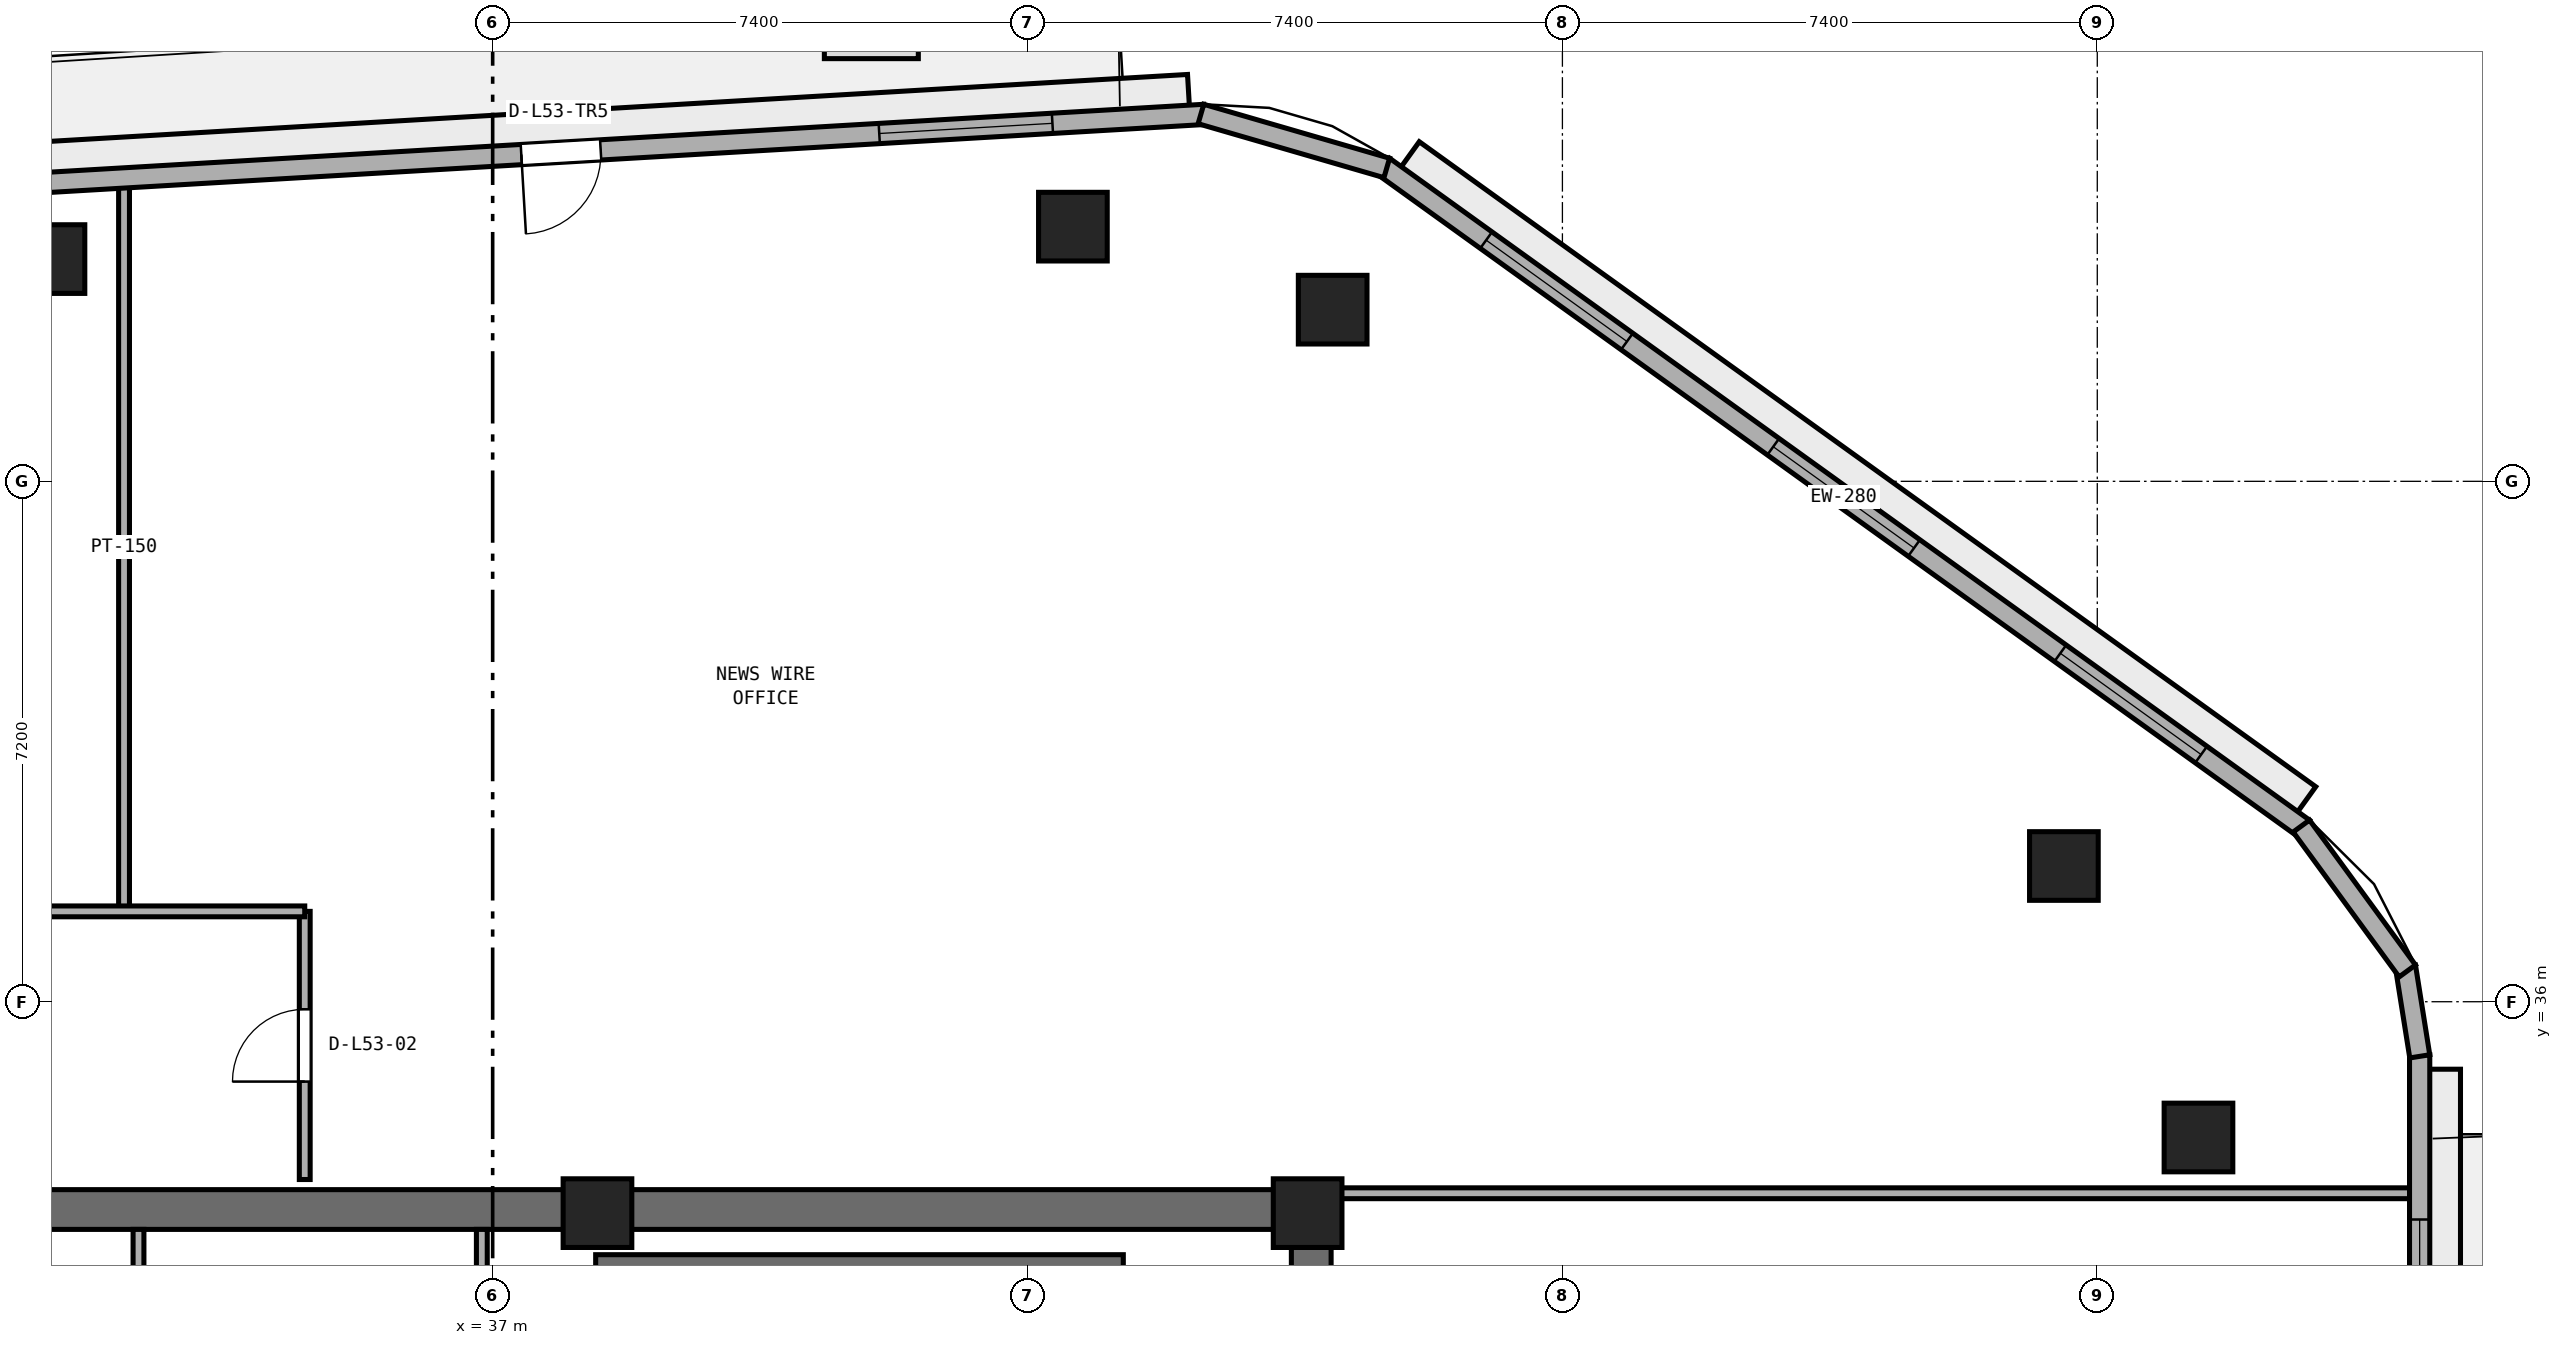
"""IFC4 building model, lengths in metres.
Left out: names, types, materials, properties, quantities, classifications, styles, units other than length and angle.
Written with IfcOpenShell. Run it as: python <this file> out.ifc"""

import sys

from ifc_helpers import new_model, si_unit, direction, frame, frame_2d, origin, origin_2d, place, context, subcontext, project, spatial, rectangle, extrude, element, fill, save


model = new_model("IFC4")
c1 = context("Model", 3, precision=1e-05, world=origin(), true_north=direction((0.0, 1.0)))
c2 = subcontext(c1, "Body", "Model", "MODEL_VIEW")
j1 = project(units=[si_unit("LENGTHUNIT", "METRE"), si_unit("PLANEANGLEUNIT", "RADIAN")], contexts=[c1])
p1 = place(None, origin())
s1 = spatial("IfcSite", under=j1, at=p1, CompositionType="ELEMENT")
p2 = place(p1, origin())
s2 = spatial("IfcBuilding", under=s1, at=p2, CompositionType="ELEMENT")
p3 = place(p2, frame((0.0, 0.0, 208.6)))
s3 = spatial("IfcBuildingStorey", under=s2, at=p3, CompositionType="ELEMENT", Elevation=208.6)
p4 = place(p3, frame((25.4, 33.125, 0.0), z_axis=(0.0, 0.0, 1.0), x_axis=(1.0, 0.0, 0.0)))
e1 = element("IfcWall", 1, at=p4, inside=s3, PredefinedType="SHEAR", context=c2, shape_type="SweptSolid", body=[
    extrude(rectangle(XDim=23.2, YDim=0.55, at=frame_2d((11.6, 0.0))), origin(), (0.0, 0.0, 1.0), 3.54),
])
p5 = place(p3, frame((48.325, 17.55, 0.0), z_axis=(0.0, 0.0, 1.0), x_axis=(0.0, 1.0, 0.0)))
e2 = element("IfcWall", 2, at=p5, inside=s3, PredefinedType="SHEAR", context=c2, shape_type="SweptSolid", body=[
    extrude(rectangle(XDim=15.3, YDim=0.55, at=frame_2d((7.65, 0.0))), origin(), (0.0, 0.0, 1.0), 3.54),
])
p6 = place(p5, frame((5.75, 0.0, 0.0)))
e3 = element("IfcOpeningElement", 3, at=p6, cuts=e2, PredefinedType="OPENING", context=c2, shape_type="SweptSolid", body=[
    extrude(rectangle(XDim=1.5, YDim=2.15, at=frame_2d((0.75, 1.075))), frame((0.0, 0.285, 0.0), z_axis=(0.0, -1.0, 0.0), x_axis=(1.0, 0.0, 0.0)), (0.0, 0.0, 1.0), 0.57),
])
for number, where, z_axis, x_axis in (
    (4, (48.275, 33.075, 0.0), (0.0, 0.0, 1.0), (1.0, 0.0, 0.0)),
    (5, (38.45, 33.075, 0.0), (0.0, 0.0, 1.0), (1.0, 0.0, 0.0)),
):
    element("IfcColumn", number, at=place(p3, frame(where, z_axis=z_axis, x_axis=x_axis)), inside=s3, PredefinedType="PILASTER", context=c2, shape_type="SweptSolid", body=[
        extrude(rectangle(XDim=0.95, YDim=0.95, at=origin_2d()), origin(), (0.0, 0.0, 1.0), 3.8),
    ])
for number, where, z_axis, x_axis in (
    (6, (60.6, 34.122, 0.0), (0.0, 0.0, 1.0), (1.0, 0.0, 0.0)),
    (7, (58.738, 37.878, 0.0), (0.0, 0.0, 1.0), (1.0, 0.0, 0.0)),
    (8, (48.622, 45.575, 0.0), (0.0, 0.0, 1.0), (1.0, 0.0, 0.0)),
    (9, (45.028, 46.724, 0.0), (0.0, 0.0, 1.0), (1.0, 0.0, 0.0)),
    (10, (30.882, 46.275, 0.0), (0.0, 0.0, 1.0), (1.0, 0.0, 0.0)),
):
    element("IfcColumn", number, at=place(p3, frame(where, z_axis=z_axis, x_axis=x_axis)), inside=s3, PredefinedType="COLUMN", context=c2, shape_type="SweptSolid", body=[
        extrude(rectangle(XDim=0.95, YDim=0.95, at=origin_2d()), origin(), (0.0, 0.0, 1.0), 3.8),
    ])
p7 = place(p3, frame((38.425, 32.375, 0.0), z_axis=(0.0, 0.0, 1.0), x_axis=(1.0, 0.0, 0.0)))
e11 = element("IfcWall", 11, at=p7, inside=s3, PredefinedType="SHEAR", context=c2, shape_type="SweptSolid", body=[
    extrude(rectangle(XDim=7.3, YDim=0.25, at=frame_2d((3.65, 0.0))), origin(), (0.0, 0.0, 1.0), 3.54),
])
for number, where, z_axis, x_axis in (
    (12, (32.1, 30.65, 0.0), (0.0, 0.0, 1.0), (0.0, 1.0, 0.0)),
    (13, (36.85, 30.65, 0.0), (0.0, 0.0, 1.0), (0.0, 1.0, 0.0)),
):
    element("IfcWall", number, at=place(p3, frame(where, z_axis=z_axis, x_axis=x_axis)), inside=s3, PredefinedType="PARTITIONING", context=c2, shape_type="SweptSolid", body=[
        extrude(rectangle(XDim=2.2, YDim=0.15, at=frame_2d((1.1, 0.0))), origin(), (0.0, 0.0, 1.0), 3.54),
    ])
p8 = place(p3, frame((34.4, 33.54, 0.0), z_axis=(0.0, 0.0, 1.0), x_axis=(0.0, 1.0, 0.0)))
e14 = element("IfcWall", 14, at=p8, inside=s3, PredefinedType="PARTITIONING", context=c2, shape_type="SweptSolid", body=[
    extrude(rectangle(XDim=3.71, YDim=0.15, at=frame_2d((1.855, 0.0))), origin(), (0.0, 0.0, 1.0), 3.54),
])
p9 = place(p8, frame((1.355, 0.0, 0.0)))
e15 = element("IfcOpeningElement", 15, at=p9, cuts=e14, PredefinedType="OPENING", context=c2, shape_type="SweptSolid", body=[
    extrude(rectangle(XDim=1.0, YDim=2.12, at=frame_2d((0.5, 1.06))), frame((0.0, 0.085, 0.0), z_axis=(0.0, -1.0, 0.0), x_axis=(1.0, 0.0, 0.0)), (0.0, 0.0, 1.0), 0.17),
])
p10 = place(p3, frame((31.9, 37.25, 0.0), z_axis=(0.0, 0.0, 1.0), x_axis=(0.0, 1.0, 0.0)))
e16 = element("IfcWall", 16, at=p10, inside=s3, PredefinedType="PARTITIONING", context=c2, shape_type="SweptSolid", body=[
    extrude(rectangle(XDim=10.083, YDim=0.15, at=frame_2d((5.042, 0.0))), origin(), (0.0, 0.0, 1.0), 3.54),
])
p11 = place(p3, frame((48.74, 33.35, 0.0), z_axis=(0.0, 0.0, 1.0), x_axis=(1.0, 0.0, 0.0)))
e17 = element("IfcWall", 17, at=p11, inside=s3, PredefinedType="PARTITIONING", context=c2, shape_type="SweptSolid", body=[
    extrude(rectangle(XDim=14.855, YDim=0.15, at=frame_2d((7.427, 0.0))), origin(), (0.0, 0.0, 1.0), 2.923),
])
p12 = place(p3, frame((21.55, 37.25, 0.0), z_axis=(0.0, 0.0, 1.0), x_axis=(1.0, 0.0, 0.0)))
e18 = element("IfcWall", 18, at=p12, inside=s3, PredefinedType="PARTITIONING", context=c2, shape_type="SweptSolid", body=[
    extrude(rectangle(XDim=12.85, YDim=0.15, at=frame_2d((6.425, 0.0))), origin(), (0.0, 0.0, 1.0), 3.54),
])
p13 = place(p12, frame((4.795, 0.0, 0.0)))
e19 = element("IfcOpeningElement", 19, at=p13, cuts=e18, PredefinedType="OPENING", context=c2, shape_type="SweptSolid", body=[
    extrude(rectangle(XDim=1.0, YDim=2.12, at=frame_2d((0.5, 1.06))), frame((0.0, 0.085, 0.0), z_axis=(0.0, -1.0, 0.0), x_axis=(1.0, 0.0, 0.0)), (0.0, 0.0, 1.0), 0.17),
])
p14 = place(p3, frame((63.66, 16.39, 0.0), z_axis=(0.0, 0.0, 1.0), x_axis=(0.0, 1.0, 0.0)))
e20 = element("IfcWall", 20, at=p14, inside=s3, PredefinedType="STANDARD", context=c2, shape_type="SweptSolid", body=[
    extrude(rectangle(XDim=18.876, YDim=0.28, at=frame_2d((9.438, 0.0))), origin(), (0.0, 0.0, 1.0), 3.54),
])
p15 = place(p14, frame((8.588, 0.0, 0.0)))
e21 = element("IfcOpeningElement", 21, at=p15, cuts=e20, PredefinedType="OPENING", context=c2, shape_type="SweptSolid", body=[
    extrude(rectangle(XDim=1.1, YDim=2.2, at=frame_2d((0.55, 1.1))), frame((0.0, 0.15, 0.0), z_axis=(0.0, -1.0, 0.0), x_axis=(1.0, 0.0, 0.0)), (0.0, 0.0, 1.0), 0.3),
])
p16 = place(p14, frame((2.029, 0.0, 0.9)))
e22 = element("IfcOpeningElement", 22, at=p16, cuts=e20, PredefinedType="OPENING", context=c2, shape_type="SweptSolid", body=[
    extrude(rectangle(XDim=2.4, YDim=1.75, at=frame_2d((1.2, 0.875))), frame((0.0, 0.15, 0.0), z_axis=(0.0, -1.0, 0.0), x_axis=(1.0, 0.0, 0.0)), (0.0, 0.0, 1.0), 0.3),
])
p17 = place(p14, frame((14.197, 0.0, 0.9)))
e23 = element("IfcOpeningElement", 23, at=p17, cuts=e20, PredefinedType="OPENING", context=c2, shape_type="SweptSolid", body=[
    extrude(rectangle(XDim=2.4, YDim=1.75, at=frame_2d((1.2, 0.875))), frame((0.0, 0.15, 0.0), z_axis=(0.0, -1.0, 0.0), x_axis=(1.0, 0.0, 0.0)), (0.0, 0.0, 1.0), 0.3),
])
p18 = place(p3, frame((62.054, 38.399, 0.0), z_axis=(0.0, 0.0, 1.0), x_axis=(-0.81172124793, 0.584045045915, 0.0)))
e24 = element("IfcWall", 24, at=p18, inside=s3, PredefinedType="STANDARD", context=c2, shape_type="SweptSolid", body=[
    extrude(rectangle(XDim=15.679, YDim=0.28, at=frame_2d((7.84, 0.0))), origin(), (0.0, 0.0, 1.0), 3.54),
])
p19 = place(p18, frame((1.747, 0.0, 0.9)))
e25 = element("IfcOpeningElement", 25, at=p19, cuts=e24, PredefinedType="OPENING", context=c2, shape_type="SweptSolid", body=[
    extrude(rectangle(XDim=2.4, YDim=1.75, at=frame_2d((1.2, 0.875))), frame((0.0, 0.15, 0.0), z_axis=(0.0, -1.0, 0.0), x_axis=(1.0, 0.0, 0.0)), (0.0, 0.0, 1.0), 0.3),
])
p20 = place(p18, frame((6.64, 0.0, 0.9)))
e26 = element("IfcOpeningElement", 26, at=p20, cuts=e24, PredefinedType="OPENING", context=c2, shape_type="SweptSolid", body=[
    extrude(rectangle(XDim=2.4, YDim=1.75, at=frame_2d((1.2, 0.875))), frame((0.0, 0.15, 0.0), z_axis=(0.0, -1.0, 0.0), x_axis=(1.0, 0.0, 0.0)), (0.0, 0.0, 1.0), 0.3),
])
p21 = place(p18, frame((11.533, 0.0, 0.9)))
e27 = element("IfcOpeningElement", 27, at=p21, cuts=e24, PredefinedType="OPENING", context=c2, shape_type="SweptSolid", body=[
    extrude(rectangle(XDim=2.4, YDim=1.75, at=frame_2d((1.2, 0.875))), frame((0.0, 0.15, 0.0), z_axis=(0.0, -1.0, 0.0), x_axis=(1.0, 0.0, 0.0)), (0.0, 0.0, 1.0), 0.3),
])
p22 = place(p3, frame((46.846, 48.277, 0.0), z_axis=(0.0, 0.0, 1.0), x_axis=(-0.998273806631, -0.05873165241, 0.0)))
e28 = element("IfcWall", 28, at=p22, inside=s3, PredefinedType="STANDARD", context=c2, shape_type="SweptSolid", body=[
    extrude(rectangle(XDim=17.833, YDim=0.28, at=frame_2d((8.917, 0.0))), origin(), (0.0, 0.0, 1.0), 3.54),
])
p23 = place(p22, frame((8.366, 0.0, 0.0)))
e29 = element("IfcOpeningElement", 29, at=p23, cuts=e28, PredefinedType="OPENING", context=c2, shape_type="SweptSolid", body=[
    extrude(rectangle(XDim=1.1, YDim=2.2, at=frame_2d((0.55, 1.1))), frame((0.0, 0.15, 0.0), z_axis=(0.0, -1.0, 0.0), x_axis=(1.0, 0.0, 0.0)), (0.0, 0.0, 1.0), 0.3),
])
p24 = place(p22, frame((2.105, 0.0, 0.9)))
e30 = element("IfcOpeningElement", 30, at=p24, cuts=e28, PredefinedType="OPENING", context=c2, shape_type="SweptSolid", body=[
    extrude(rectangle(XDim=2.4, YDim=1.75, at=frame_2d((1.2, 0.875))), frame((0.0, 0.15, 0.0), z_axis=(0.0, -1.0, 0.0), x_axis=(1.0, 0.0, 0.0)), (0.0, 0.0, 1.0), 0.3),
])
p25 = place(p3, frame((63.662, 35.244, 0.0), z_axis=(0.0, 0.0, 1.0), x_axis=(-0.157059104921, 0.987589204863, 0.0)))
e31 = element("IfcWall", 31, at=p25, inside=s3, PredefinedType="STANDARD", context=c2, shape_type="SweptSolid", body=[
    extrude(rectangle(XDim=1.258, YDim=0.28, at=frame_2d((0.629, 0.0))), origin(), (0.0, 0.0, 1.0), 3.54),
])
p26 = place(p3, frame((63.489, 36.426, 0.0), z_axis=(0.0, 0.0, 1.0), x_axis=(-0.590267940876, 0.80720738226, 0.0)))
e32 = element("IfcWall", 32, at=p26, inside=s3, PredefinedType="STANDARD", context=c2, shape_type="SweptSolid", body=[
    extrude(rectangle(XDim=2.484, YDim=0.28, at=frame_2d((1.242, 0.0))), origin(), (0.0, 0.0, 1.0), 3.54),
])
p27 = place(p3, frame((49.37, 47.536, 0.0), z_axis=(0.0, 0.0, 1.0), x_axis=(-0.960380089791, 0.278693529048, 0.0)))
e33 = element("IfcWall", 33, at=p27, inside=s3, PredefinedType="STANDARD", context=c2, shape_type="SweptSolid", body=[
    extrude(rectangle(XDim=2.677, YDim=0.28, at=frame_2d((1.338, 0.0))), origin(), (0.0, 0.0, 1.0), 3.54),
])
p28 = place(p9, origin())
e34 = element("IfcDoor", 34, at=p28, inside=s3, OperationType="SINGLE_SWING_LEFT", PredefinedType="DOOR", context=c2, shape_type="SweptSolid", body=[
    extrude(rectangle(XDim=1.0, YDim=2.12, at=frame_2d((0.5, 1.06))), frame((0.0, 0.025, 0.0), z_axis=(0.0, -1.0, 0.0), x_axis=(1.0, 0.0, 0.0)), (0.0, 0.0, 1.0), 0.05),
])
fill(e15, e34)
p29 = place(p17, origin())
e35 = element("IfcWindow", 35, at=p29, inside=s3, PartitioningType="SINGLE_PANEL", PredefinedType="WINDOW", context=c2, shape_type="SweptSolid", body=[
    extrude(rectangle(XDim=2.4, YDim=1.75, at=frame_2d((1.2, 0.875))), frame((0.0, 0.03, 0.0), z_axis=(0.0, -1.0, 0.0), x_axis=(1.0, 0.0, 0.0)), (0.0, 0.0, 1.0), 0.06),
])
fill(e23, e35)
p30 = place(p19, origin())
e36 = element("IfcWindow", 36, at=p30, inside=s3, PartitioningType="SINGLE_PANEL", PredefinedType="WINDOW", context=c2, shape_type="SweptSolid", body=[
    extrude(rectangle(XDim=2.4, YDim=1.75, at=frame_2d((1.2, 0.875))), frame((0.0, 0.03, 0.0), z_axis=(0.0, -1.0, 0.0), x_axis=(1.0, 0.0, 0.0)), (0.0, 0.0, 1.0), 0.06),
])
fill(e25, e36)
p31 = place(p20, origin())
e37 = element("IfcWindow", 37, at=p31, inside=s3, PartitioningType="SINGLE_PANEL", PredefinedType="WINDOW", context=c2, shape_type="SweptSolid", body=[
    extrude(rectangle(XDim=2.4, YDim=1.75, at=frame_2d((1.2, 0.875))), frame((0.0, 0.03, 0.0), z_axis=(0.0, -1.0, 0.0), x_axis=(1.0, 0.0, 0.0)), (0.0, 0.0, 1.0), 0.06),
])
fill(e26, e37)
p32 = place(p21, origin())
e38 = element("IfcWindow", 38, at=p32, inside=s3, PartitioningType="SINGLE_PANEL", PredefinedType="WINDOW", context=c2, shape_type="SweptSolid", body=[
    extrude(rectangle(XDim=2.4, YDim=1.75, at=frame_2d((1.2, 0.875))), frame((0.0, 0.03, 0.0), z_axis=(0.0, -1.0, 0.0), x_axis=(1.0, 0.0, 0.0)), (0.0, 0.0, 1.0), 0.06),
])
fill(e27, e38)
p33 = place(p23, origin())
e39 = element("IfcDoor", 39, at=p33, inside=s3, OperationType="SINGLE_SWING_RIGHT", PredefinedType="DOOR", context=c2, shape_type="SweptSolid", body=[
    extrude(rectangle(XDim=1.1, YDim=2.2, at=frame_2d((0.55, 1.1))), frame((0.0, 0.025, 0.0), z_axis=(0.0, -1.0, 0.0), x_axis=(1.0, 0.0, 0.0)), (0.0, 0.0, 1.0), 0.05),
])
fill(e29, e39)
p34 = place(p24, origin())
e40 = element("IfcWindow", 40, at=p34, inside=s3, PartitioningType="SINGLE_PANEL", PredefinedType="WINDOW", context=c2, shape_type="SweptSolid", body=[
    extrude(rectangle(XDim=2.4, YDim=1.75, at=frame_2d((1.2, 0.875))), frame((0.0, 0.03, 0.0), z_axis=(0.0, -1.0, 0.0), x_axis=(1.0, 0.0, 0.0)), (0.0, 0.0, 1.0), 0.06),
])
fill(e30, e40)
save(model, sys.argv[1])
